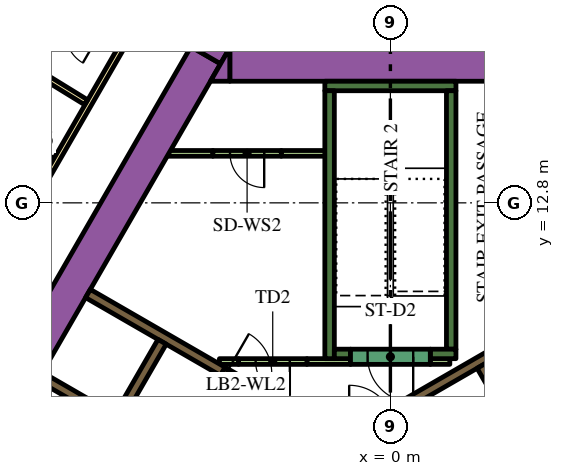
"""IFC4 building model, lengths in metres.
Left out: names, types, materials, properties, quantities, classifications, styles, units other than length and angle.
Written with IfcOpenShell. Run it as: python <this file> out.ifc"""

import sys

from ifc_helpers import new_model, si_unit, direction, frame, frame_2d, origin, place, context, subcontext, project, spatial, polyline, rectangle, outline, extrude, element, fill, save


model = new_model("IFC4")
c1 = context("Model", 3, precision=1e-05, world=origin(), true_north=direction((0.0, 1.0)))
c2 = subcontext(c1, "Body", "Model", "MODEL_VIEW")
j1 = project(units=[si_unit("LENGTHUNIT", "METRE"), si_unit("PLANEANGLEUNIT", "RADIAN")], contexts=[c1])
p1 = place(None, origin())
s1 = spatial("IfcSite", under=j1, at=p1, CompositionType="ELEMENT")
p2 = place(p1, origin())
s2 = spatial("IfcBuilding", under=s1, at=p2, CompositionType="ELEMENT")
p3 = place(p2, frame((0.0, 0.0, 31.5)))
s3 = spatial("IfcBuildingStorey", under=s2, at=p3, CompositionType="ELEMENT", Elevation=31.5)
p4 = place(p3, frame((-15.36, -1.503, 0.0), z_axis=(0.0, 0.0, 1.0), x_axis=(0.50000389221, 0.866023156604, 0.0)))
e1 = element("IfcWall", 1, at=p4, inside=s3, PredefinedType="SOLIDWALL", context=c2, shape_type="SweptSolid", body=[
    extrude(rectangle(XDim=21.0, YDim=0.9, at=frame_2d((10.5, 0.0))), origin(), (0.0, 0.0, 1.0), 3.9),
])
p5 = place(p3, origin())
e2 = element("IfcWall", 2, at=p5, inside=s3, PredefinedType="SOLIDWALL", context=c2, shape_type="SweptSolid", body=[
    extrude(outline(polyline([(-4.215, 16.9), (-4.469, 16.46), (-5.231, 16.9), (-4.215, 16.9)])), origin(), (0.0, 0.0, 1.0), 3.9),
])
p6 = place(p3, frame((-4.224, 16.45, 0.0), z_axis=(0.0, 0.0, 1.0), x_axis=(1.0, 0.0, 0.0)))
e3 = element("IfcWall", 3, at=p6, inside=s3, PredefinedType="SOLIDWALL", context=c2, shape_type="SweptSolid", body=[
    extrude(rectangle(XDim=9.488, YDim=0.9, at=frame_2d((4.744, 0.0))), origin(), (0.0, 0.0, 1.0), 3.9),
])
e4 = element("IfcWall", 4, at=p5, inside=s3, PredefinedType="SOLIDWALL", context=c2, shape_type="SweptSolid", body=[
    extrude(outline(polyline([(-4.734, 16.0), (-4.226, 16.88), (-4.226, 16.0), (-4.734, 16.0)])), origin(), (0.0, 0.0, 1.0), 3.9),
])
p7 = place(p3, frame((-1.725, 15.875, 0.0), z_axis=(0.0, 0.0, 1.0), x_axis=(1.0, 0.0, 0.0)))
e5 = element("IfcWall", 5, at=p7, inside=s3, PredefinedType="SOLIDWALL", context=c2, shape_type="SweptSolid", body=[
    extrude(rectangle(XDim=3.45, YDim=0.25, at=frame_2d((1.725, 0.0))), origin(), (0.0, 0.0, 1.0), 3.9),
])
p8 = place(p3, frame((1.6, 8.95, 0.0), z_axis=(0.0, 0.0, 1.0), x_axis=(0.0, 1.0, 0.0)))
e6 = element("IfcWall", 6, at=p8, inside=s3, PredefinedType="SOLIDWALL", context=c2, shape_type="SweptSolid", body=[
    extrude(rectangle(XDim=6.8, YDim=0.25, at=frame_2d((3.4, 0.0))), origin(), (0.0, 0.0, 1.0), 3.9),
])
p9 = place(p3, frame((1.05, 8.825, 0.0), z_axis=(0.0, 0.0, 1.0), x_axis=(1.0, 0.0, 0.0)))
e7 = element("IfcWall", 7, at=p9, inside=s3, PredefinedType="SOLIDWALL", context=c2, shape_type="SweptSolid", body=[
    extrude(rectangle(XDim=0.675, YDim=0.25, at=frame_2d((0.337, 0.0))), origin(), (0.0, 0.0, 1.0), 3.9),
])
p10 = place(p3, frame((-1.6, 8.7, 0.0), z_axis=(0.0, 0.0, 1.0), x_axis=(0.0, 1.0, 0.0)))
e8 = element("IfcWall", 8, at=p10, inside=s3, PredefinedType="SOLIDWALL", context=c2, shape_type="SweptSolid", body=[
    extrude(rectangle(XDim=7.05, YDim=0.25, at=frame_2d((3.525, 0.0))), origin(), (0.0, 0.0, 1.0), 3.9),
])
p11 = place(p3, frame((-1.475, 8.825, 0.0), z_axis=(0.0, 0.0, 1.0), x_axis=(1.0, 0.0, 0.0)))
e9 = element("IfcWall", 9, at=p11, inside=s3, PredefinedType="SOLIDWALL", context=c2, shape_type="SweptSolid", body=[
    extrude(rectangle(XDim=0.425, YDim=0.25, at=frame_2d((0.212, 0.0))), origin(), (0.0, 0.0, 1.0), 3.9),
])
p12 = place(p3, frame((0.314, 7.456, 0.0), z_axis=(0.0, 0.0, 1.0), x_axis=(0.866013897511, 0.50001992892, 0.0)))
e10 = element("IfcWall", 10, at=p12, inside=s3, PredefinedType="SOLIDWALL", context=c2, shape_type="SweptSolid", body=[
    extrude(rectangle(XDim=3.268, YDim=0.25, at=frame_2d((1.634, 0.0))), origin(), (0.0, 0.0, 1.0), 3.9),
])
e11 = element("IfcWall", 11, at=p5, inside=s3, PredefinedType="SOLIDWALL", context=c2, shape_type="SweptSolid", body=[
    extrude(outline(polyline([(-3.128, 7.481), (-3.259, 7.557), (-3.134, 7.773), (-3.003, 7.698), (-3.128, 7.481)])), origin(), (0.0, 0.0, 1.0), 3.9),
])
p13 = place(p3, frame((-7.314, 7.132, 0.0), z_axis=(0.0, 0.0, 1.0), x_axis=(-0.866008176907, 0.50002983664, 0.0)))
e12 = element("IfcWall", 12, at=p13, inside=s3, PredefinedType="SOLIDWALL", context=c2, shape_type="SweptSolid", body=[
    extrude(rectangle(XDim=2.2, YDim=0.25, at=frame_2d((1.1, 0.0))), origin(), (0.0, 0.0, 1.0), 3.9),
])
p14 = place(p3, frame((-7.959, 10.415, 0.0), z_axis=(0.0, 0.0, 1.0), x_axis=(0.866020958405, -0.500007699544, 0.0)))
e13 = element("IfcWall", 13, at=p14, inside=s3, PredefinedType="SOLIDWALL", context=c2, shape_type="SweptSolid", body=[
    extrude(rectangle(XDim=4.1, YDim=0.25, at=frame_2d((2.05, 0.0))), origin(), (0.0, 0.0, 1.0), 3.9),
])
p15 = place(p3, frame((-3.997, 8.625, 0.0), z_axis=(0.0, 0.0, 1.0), x_axis=(-1.0, 0.0, 0.0)))
e14 = element("IfcWall", 14, at=p15, inside=s3, PredefinedType="PARTITIONING", context=c2, shape_type="SweptSolid", body=[
    extrude(rectangle(XDim=0.502, YDim=0.15, at=frame_2d((0.251, 0.0))), origin(), (0.0, 0.0, 1.0), 2.75),
])
p16 = place(p3, frame((-2.196, 8.625, 0.0), z_axis=(0.0, 0.0, 1.0), x_axis=(1.0, 0.0, 0.0)))
e15 = element("IfcWall", 15, at=p16, inside=s3, PredefinedType="PARTITIONING", context=c2, shape_type="SweptSolid", body=[
    extrude(rectangle(XDim=1.146, YDim=0.15, at=frame_2d((0.573, 0.0))), origin(), (0.0, 0.0, 1.0), 2.75),
])
p17 = place(p3, frame((-5.851, 14.102, 0.0), z_axis=(0.0, 0.0, 1.0), x_axis=(1.0, 0.0, 0.0)))
e16 = element("IfcWall", 16, at=p17, inside=s3, PredefinedType="PARTITIONING", context=c2, shape_type="SweptSolid", body=[
    extrude(rectangle(XDim=1.18, YDim=0.15, at=frame_2d((0.59, 0.0))), origin(), (0.0, 0.0, 1.0), 2.75),
])
p18 = place(p3, frame((-2.871, 14.102, 0.0), z_axis=(0.0, 0.0, 1.0), x_axis=(1.0, 0.0, 0.0)))
e17 = element("IfcWall", 17, at=p18, inside=s3, PredefinedType="PARTITIONING", context=c2, shape_type="SweptSolid", body=[
    extrude(rectangle(XDim=1.196, YDim=0.15, at=frame_2d((0.598, 0.0))), origin(), (0.0, 0.0, 1.0), 2.75),
])
p19 = place(p3, frame((1.05, 8.625, 0.0), z_axis=(0.0, 0.0, 1.0), x_axis=(1.0, 0.0, 0.0)))
e18 = element("IfcWall", 18, at=p19, inside=s3, PredefinedType="PARTITIONING", context=c2, shape_type="SweptSolid", body=[
    extrude(rectangle(XDim=0.514, YDim=0.15, at=frame_2d((0.257, 0.0))), origin(), (0.0, 0.0, 1.0), 2.75),
])
p20 = place(p3, frame((8.565, -2.185, 0.0), z_axis=(0.0, 0.0, 1.0), x_axis=(-0.499997954832, 0.866026584559, 0.0)))
e19 = element("IfcWall", 19, at=p20, inside=s3, PredefinedType="SOLIDWALL", context=c2, shape_type="SweptSolid", body=[
    extrude(rectangle(XDim=12.35, YDim=0.25, at=frame_2d((6.175, 0.0))), origin(), (0.0, 0.0, 1.0), 3.9),
])
p21 = place(p20, frame((5.725, 0.0, 0.0)))
e20 = element("IfcOpeningElement", 20, at=p21, cuts=e19, PredefinedType="OPENING", context=c2, shape_type="SweptSolid", body=[
    extrude(rectangle(XDim=0.9, YDim=2.1, at=frame_2d((0.45, 1.05))), frame((0.0, 0.135, 0.0), z_axis=(0.0, -1.0, 0.0), x_axis=(1.0, 0.0, 0.0)), (0.0, 0.0, 1.0), 0.27),
])
p22 = place(p3, frame((-6.008, 9.144, 0.0), z_axis=(0.0, 0.0, 1.0), x_axis=(-0.500006956611, -0.866021387346, 0.0)))
e21 = element("IfcWall", 21, at=p22, inside=s3, PredefinedType="SOLIDWALL", context=c2, shape_type="SweptSolid", body=[
    extrude(rectangle(XDim=9.83, YDim=0.25, at=frame_2d((4.915, 0.0))), origin(), (0.0, 0.0, 1.0), 3.9),
])
p23 = place(p22, frame((6.985, 0.0, 0.0)))
e22 = element("IfcOpeningElement", 22, at=p23, cuts=e21, PredefinedType="OPENING", context=c2, shape_type="SweptSolid", body=[
    extrude(rectangle(XDim=0.9, YDim=2.1, at=frame_2d((0.45, 1.05))), frame((0.0, 0.135, 0.0), z_axis=(0.0, -1.0, 0.0), x_axis=(1.0, 0.0, 0.0)), (0.0, 0.0, 1.0), 0.27),
])
p24 = place(p3, frame((1.05, 8.75, 0.0), z_axis=(0.0, 0.0, 1.0), x_axis=(-1.0, 0.0, 0.0)))
e23 = element("IfcWall", 23, at=p24, inside=s3, PredefinedType="SOLIDWALL", context=c2, shape_type="SweptSolid", body=[
    extrude(rectangle(XDim=2.1, YDim=0.4, at=frame_2d((1.05, 0.0))), origin(), (0.0, 0.0, 1.0), 3.9),
])
p25 = place(p24, frame((0.45, 0.0, 0.0)))
e24 = element("IfcOpeningElement", 24, at=p25, cuts=e23, PredefinedType="OPENING", context=c2, shape_type="SweptSolid", body=[
    extrude(rectangle(XDim=1.2, YDim=2.1, at=frame_2d((0.6, 1.05))), frame((0.0, 0.21, 0.0), z_axis=(0.0, -1.0, 0.0), x_axis=(1.0, 0.0, 0.0)), (0.0, 0.0, 1.0), 0.42),
])
p26 = place(p3, frame((-2.196, 8.625, 0.0), z_axis=(0.0, 0.0, 1.0), x_axis=(-1.0, 0.0, 0.0)))
e25 = element("IfcWall", 25, at=p26, inside=s3, PredefinedType="PARTITIONING", context=c2, shape_type="SweptSolid", body=[
    extrude(rectangle(XDim=1.8, YDim=0.15, at=frame_2d((0.9, 0.0))), origin(), (0.0, 0.0, 1.0), 2.75),
])
p27 = place(p26, frame((0.45, 0.0, 0.0)))
e26 = element("IfcOpeningElement", 26, at=p27, cuts=e25, PredefinedType="OPENING", context=c2, shape_type="SweptSolid", body=[
    extrude(rectangle(XDim=0.9, YDim=2.1, at=frame_2d((0.45, 1.05))), frame((0.0, 0.085, 0.0), z_axis=(0.0, -1.0, 0.0), x_axis=(1.0, 0.0, 0.0)), (0.0, 0.0, 1.0), 0.17),
])
p28 = place(p3, frame((-4.409, 8.365, 0.0), z_axis=(0.0, 0.0, 1.0), x_axis=(0.866034573852, -0.49998411664, 0.0)))
e27 = element("IfcWall", 27, at=p28, inside=s3, PredefinedType="SOLIDWALL", context=c2, shape_type="SweptSolid", body=[
    extrude(rectangle(XDim=1.4, YDim=0.25, at=frame_2d((0.7, 0.0))), origin(), (0.0, 0.0, 1.0), 3.9),
])
p29 = place(p28, frame((0.1, 0.0, 0.0)))
e28 = element("IfcOpeningElement", 28, at=p29, cuts=e27, PredefinedType="OPENING", context=c2, shape_type="SweptSolid", body=[
    extrude(rectangle(XDim=1.2, YDim=2.1, at=frame_2d((0.6, 1.05))), frame((0.0, 0.135, 0.0), z_axis=(0.0, -1.0, 0.0), x_axis=(1.0, 0.0, 0.0)), (0.0, 0.0, 1.0), 0.27),
])
p30 = place(p3, frame((-2.871, 14.102, 0.0), z_axis=(0.0, 0.0, 1.0), x_axis=(-1.0, 0.0, 0.0)))
e29 = element("IfcWall", 29, at=p30, inside=s3, PredefinedType="PARTITIONING", context=c2, shape_type="SweptSolid", body=[
    extrude(rectangle(XDim=1.8, YDim=0.15, at=frame_2d((0.9, 0.0))), origin(), (0.0, 0.0, 1.0), 2.75),
])
p31 = place(p30, frame((0.45, 0.0, 0.0)))
e30 = element("IfcOpeningElement", 30, at=p31, cuts=e29, PredefinedType="OPENING", context=c2, shape_type="SweptSolid", body=[
    extrude(rectangle(XDim=0.9, YDim=2.1, at=frame_2d((0.45, 1.05))), frame((0.0, 0.085, 0.0), z_axis=(0.0, -1.0, 0.0), x_axis=(1.0, 0.0, 0.0)), (0.0, 0.0, 1.0), 0.17),
])
p32 = place(p3, frame((-19.081, -3.9, 0.0), z_axis=(0.0, 0.0, 1.0), x_axis=(0.499998313975, 0.866026377209, 0.0)))
e31 = element("IfcWall", 31, at=p32, inside=s3, PredefinedType="PARTITIONING", context=c2, shape_type="SweptSolid", body=[
    extrude(rectangle(XDim=25.766, YDim=0.15, at=frame_2d((12.883, 0.0))), origin(), (0.0, 0.0, 1.0), 2.75),
])
p33 = place(p32, frame((24.586, 0.0, 0.0)))
e32 = element("IfcOpeningElement", 32, at=p33, cuts=e31, PredefinedType="OPENING", context=c2, shape_type="SweptSolid", body=[
    extrude(rectangle(XDim=1.0, YDim=2.1, at=frame_2d((0.5, 1.05))), frame((0.0, 0.085, 0.0), z_axis=(0.0, -1.0, 0.0), x_axis=(1.0, 0.0, 0.0)), (0.0, 0.0, 1.0), 0.17),
])
p34 = place(p32, frame((16.196, 0.0, 0.0)))
e33 = element("IfcOpeningElement", 33, at=p34, cuts=e31, PredefinedType="OPENING", context=c2, shape_type="SweptSolid", body=[
    extrude(rectangle(XDim=1.0, YDim=2.1, at=frame_2d((0.5, 1.05))), frame((0.0, 0.085, 0.0), z_axis=(0.0, -1.0, 0.0), x_axis=(1.0, 0.0, 0.0)), (0.0, 0.0, 1.0), 0.17),
])
p35 = place(p32, frame((14.789, 0.0, 0.0)))
e34 = element("IfcOpeningElement", 34, at=p35, cuts=e31, PredefinedType="OPENING", context=c2, shape_type="SweptSolid", body=[
    extrude(rectangle(XDim=1.1, YDim=2.1, at=frame_2d((0.55, 1.05))), frame((0.0, 0.085, 0.0), z_axis=(0.0, -1.0, 0.0), x_axis=(1.0, 0.0, 0.0)), (0.0, 0.0, 1.0), 0.17),
])
p36 = place(p32, frame((3.698, 0.0, 0.0)))
e35 = element("IfcOpeningElement", 35, at=p36, cuts=e31, PredefinedType="OPENING", context=c2, shape_type="SweptSolid", body=[
    extrude(rectangle(XDim=1.0, YDim=2.1, at=frame_2d((0.5, 1.05))), frame((0.0, 0.085, 0.0), z_axis=(0.0, -1.0, 0.0), x_axis=(1.0, 0.0, 0.0)), (0.0, 0.0, 1.0), 0.17),
])
p37 = place(p32, frame((1.531, 0.0, 0.0)))
e36 = element("IfcOpeningElement", 36, at=p37, cuts=e31, PredefinedType="OPENING", context=c2, shape_type="SweptSolid", body=[
    extrude(rectangle(XDim=0.9, YDim=2.1, at=frame_2d((0.45, 1.05))), frame((0.0, 0.085, 0.0), z_axis=(0.0, -1.0, 0.0), x_axis=(1.0, 0.0, 0.0)), (0.0, 0.0, 1.0), 0.17),
])
p38 = place(p3, frame((-14.558, 19.475, 0.0), z_axis=(0.0, 0.0, 1.0), x_axis=(0.851829455142, -0.523819223925, 0.0)))
e37 = element("IfcWall", 37, at=p38, inside=s3, PredefinedType="PARTITIONING", context=c2, shape_type="SweptSolid", body=[
    extrude(rectangle(XDim=7.688, YDim=0.15, at=frame_2d((3.844, 0.0))), origin(), (0.0, 0.0, 1.0), 2.75),
])
p39 = place(p3, frame((-11.129, 15.224, 0.0), z_axis=(0.0, 0.0, 1.0), x_axis=(0.866021400173, -0.500006934395, 0.0)))
e38 = element("IfcWall", 38, at=p39, inside=s3, PredefinedType="PARTITIONING", context=c2, shape_type="SweptSolid", body=[
    extrude(rectangle(XDim=2.6, YDim=0.1, at=frame_2d((1.3, 0.0))), origin(), (0.0, 0.0, 1.0), 2.75),
])
p40 = place(p39, frame((1.1, 0.0, 0.0)))
e39 = element("IfcOpeningElement", 39, at=p40, cuts=e38, PredefinedType="OPENING", context=c2, shape_type="SweptSolid", body=[
    extrude(rectangle(XDim=0.9, YDim=2.1, at=frame_2d((0.45, 1.05))), frame((0.0, 0.06, 0.0), z_axis=(0.0, -1.0, 0.0), x_axis=(1.0, 0.0, 0.0)), (0.0, 0.0, 1.0), 0.12),
])
p41 = place(p25, origin())
e40 = element("IfcDoor", 40, at=p41, inside=s3, OperationType="SINGLE_SWING_LEFT", PredefinedType="DOOR", context=c2, shape_type="SweptSolid", body=[
    extrude(rectangle(XDim=1.2, YDim=2.1, at=frame_2d((0.6, 1.05))), frame((0.0, 0.025, 0.0), z_axis=(0.0, -1.0, 0.0), x_axis=(1.0, 0.0, 0.0)), (0.0, 0.0, 1.0), 0.05),
])
fill(e24, e40)
p42 = place(p27, origin())
e41 = element("IfcDoor", 41, at=p42, inside=s3, OperationType="SINGLE_SWING_LEFT", PredefinedType="DOOR", context=c2, shape_type="SweptSolid", body=[
    extrude(rectangle(XDim=0.9, YDim=2.1, at=frame_2d((0.45, 1.05))), frame((0.0, 0.025, 0.0), z_axis=(0.0, -1.0, 0.0), x_axis=(1.0, 0.0, 0.0)), (0.0, 0.0, 1.0), 0.05),
])
fill(e26, e41)
p43 = place(p29, origin())
e42 = element("IfcDoor", 42, at=p43, inside=s3, OperationType="SINGLE_SWING_LEFT", PredefinedType="DOOR", context=c2, shape_type="SweptSolid", body=[
    extrude(rectangle(XDim=1.2, YDim=2.1, at=frame_2d((0.6, 1.05))), frame((0.0, 0.025, 0.0), z_axis=(0.0, -1.0, 0.0), x_axis=(1.0, 0.0, 0.0)), (0.0, 0.0, 1.0), 0.05),
])
fill(e28, e42)
p44 = place(p31, origin())
e43 = element("IfcDoor", 43, at=p44, inside=s3, OperationType="SINGLE_SWING_LEFT", PredefinedType="DOOR", context=c2, shape_type="SweptSolid", body=[
    extrude(rectangle(XDim=0.9, YDim=2.1, at=frame_2d((0.45, 1.05))), frame((0.0, 0.025, 0.0), z_axis=(0.0, -1.0, 0.0), x_axis=(1.0, 0.0, 0.0)), (0.0, 0.0, 1.0), 0.05),
])
fill(e30, e43)
save(model, sys.argv[1])
